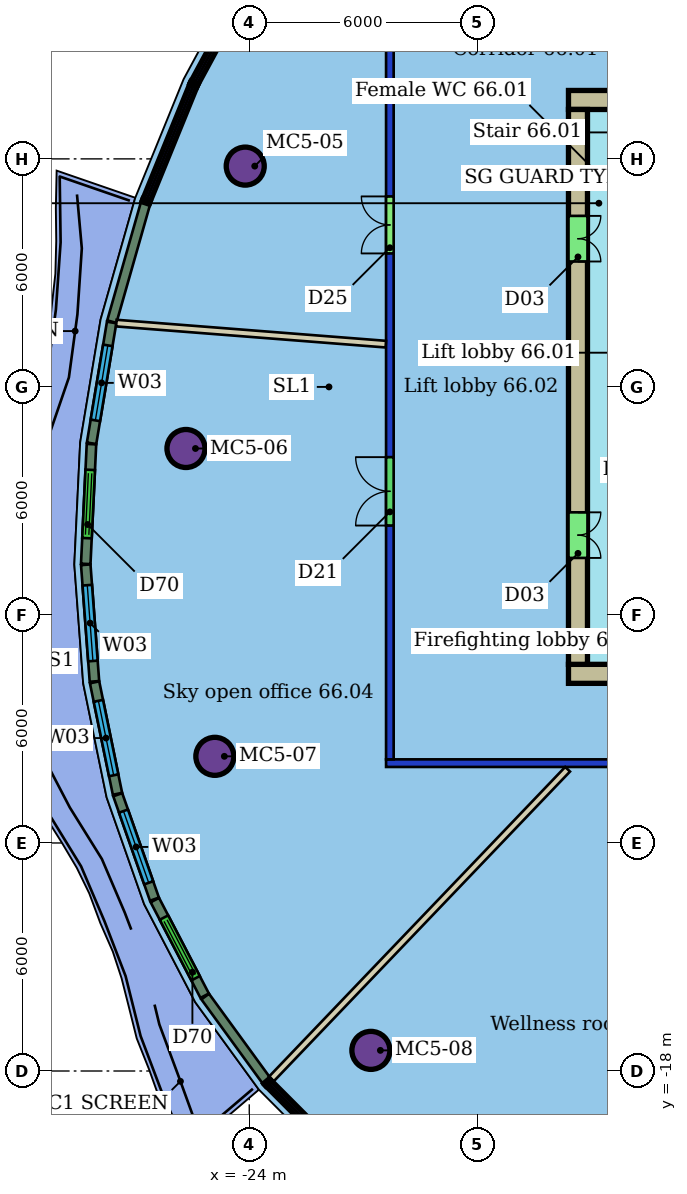
"""IFC4 building model, lengths in metres.
Left out: names, types, materials, properties, quantities, classifications, styles, units other than length and angle.
Written with IfcOpenShell. Run it as: python <this file> out.ifc"""

import sys

from ifc_helpers import new_model, si_unit, direction, frame, frame_2d, origin, origin_2d, place, context, subcontext, project, spatial, rectangle, hollow_circle, extrude, element, fill, save


model = new_model("IFC4")
c1 = context("Model", 3, precision=1e-05, world=origin(), true_north=direction((0.0, 1.0)))
c2 = subcontext(c1, "Body", "Model", "MODEL_VIEW")
j1 = project(units=[si_unit("LENGTHUNIT", "METRE"), si_unit("PLANEANGLEUNIT", "RADIAN")], contexts=[c1])
p1 = place(None, origin())
s1 = spatial("IfcSite", under=j1, at=p1, CompositionType="ELEMENT")
p2 = place(p1, origin())
s2 = spatial("IfcBuilding", under=s1, at=p2, CompositionType="ELEMENT")
p3 = place(p2, frame((0.0, 0.0, 268.5)))
s3 = spatial("IfcBuildingStorey", under=s2, at=p3, CompositionType="ELEMENT", Elevation=268.5)
for number, where, z_axis, x_axis in (
    (1, (-24.106, 5.81, 0.0), (0.0, 0.0, 1.0), (1.0, 0.0, 0.0)),
    (2, (-25.666, -1.62, 0.0), (0.0, 0.0, 1.0), (1.0, 0.0, 0.0)),
    (3, (-24.906, -9.72, 0.0), (0.0, 0.0, 1.0), (1.0, 0.0, 0.0)),
    (4, (-20.8, -17.457, 0.0), (0.0, 0.0, 1.0), (1.0, 0.0, 0.0)),
):
    element("IfcColumn", number, at=place(p3, frame(where, z_axis=z_axis, x_axis=x_axis)), inside=s3, PredefinedType="COLUMN", context=c2, shape_type="SweptSolid", body=[
        extrude(hollow_circle(Radius=0.5, WallThickness=0.04, at=origin_2d()), origin(), (0.0, 0.0, 1.0), 3.45),
    ])
p4 = place(p3, frame((8.4, -9.9, 0.0), z_axis=(0.0, 0.0, 1.0), x_axis=(-1.0, 0.0, 0.0)))
e5 = element("IfcWall", 5, at=p4, inside=s3, PredefinedType="PARTITIONING", context=c2, shape_type="SweptSolid", body=[
    extrude(rectangle(XDim=28.8, YDim=0.2, at=frame_2d((14.4, 0.0))), origin(), (0.0, 0.0, 1.0), 3.1),
])
p5 = place(p4, frame((18.739, 0.0, 0.0)))
e6 = element("IfcOpeningElement", 6, at=p5, cuts=e5, PredefinedType="OPENING", context=c2, shape_type="SweptSolid", body=[
    extrude(rectangle(XDim=1.0, YDim=2.1, at=frame_2d((0.5, 1.05))), frame((0.0, 0.11, 0.0), z_axis=(0.0, -1.0, 0.0), x_axis=(1.0, 0.0, 0.0)), (0.0, 0.0, 1.0), 0.22),
])
p6 = place(p4, frame((14.784, 0.0, 0.0)))
e7 = element("IfcOpeningElement", 7, at=p6, cuts=e5, PredefinedType="OPENING", context=c2, shape_type="SweptSolid", body=[
    extrude(rectangle(XDim=0.9, YDim=2.1, at=frame_2d((0.45, 1.05))), frame((0.0, 0.11, 0.0), z_axis=(0.0, -1.0, 0.0), x_axis=(1.0, 0.0, 0.0)), (0.0, 0.0, 1.0), 0.22),
])
p7 = place(p4, frame((9.561, 0.0, 0.0)))
e8 = element("IfcOpeningElement", 8, at=p7, cuts=e5, PredefinedType="OPENING", context=c2, shape_type="SweptSolid", body=[
    extrude(rectangle(XDim=1.0, YDim=2.1, at=frame_2d((0.5, 1.05))), frame((0.0, 0.11, 0.0), z_axis=(0.0, -1.0, 0.0), x_axis=(1.0, 0.0, 0.0)), (0.0, 0.0, 1.0), 0.22),
])
p8 = place(p4, frame((4.526, 0.0, 0.0)))
e9 = element("IfcOpeningElement", 9, at=p8, cuts=e5, PredefinedType="OPENING", context=c2, shape_type="SweptSolid", body=[
    extrude(rectangle(XDim=1.5, YDim=2.1, at=frame_2d((0.75, 1.05))), frame((0.0, 0.11, 0.0), z_axis=(0.0, -1.0, 0.0), x_axis=(1.0, 0.0, 0.0)), (0.0, 0.0, 1.0), 0.22),
])
p9 = place(p3, frame((-20.3, -9.8, 0.0), z_axis=(0.0, 0.0, 1.0), x_axis=(0.0, 1.0, 0.0)))
e10 = element("IfcWall", 10, at=p9, inside=s3, PredefinedType="PARTITIONING", context=c2, shape_type="SweptSolid", body=[
    extrude(rectangle(XDim=19.6, YDim=0.2, at=frame_2d((9.8, 0.0))), origin(), (0.0, 0.0, 1.0), 3.1),
])
p10 = place(p9, frame((13.312, 0.0, 0.0)))
e11 = element("IfcOpeningElement", 11, at=p10, cuts=e10, PredefinedType="OPENING", context=c2, shape_type="SweptSolid", body=[
    extrude(rectangle(XDim=1.5, YDim=2.4, at=frame_2d((0.75, 1.2))), frame((0.0, 0.11, 0.0), z_axis=(0.0, -1.0, 0.0), x_axis=(1.0, 0.0, 0.0)), (0.0, 0.0, 1.0), 0.22),
])
p11 = place(p9, frame((6.152, 0.0, 0.0)))
e12 = element("IfcOpeningElement", 12, at=p11, cuts=e10, PredefinedType="OPENING", context=c2, shape_type="SweptSolid", body=[
    extrude(rectangle(XDim=1.8, YDim=2.1, at=frame_2d((0.9, 1.05))), frame((0.0, 0.11, 0.0), z_axis=(0.0, -1.0, 0.0), x_axis=(1.0, 0.0, 0.0)), (0.0, 0.0, 1.0), 0.22),
])
p12 = place(p3, frame((-27.498, 1.679, 0.0), z_axis=(0.0, 0.0, 1.0), x_axis=(0.996964972733, -0.077851417097, 0.0)))
e13 = element("IfcWall", 13, at=p12, inside=s3, PredefinedType="PARTITIONING", context=c2, shape_type="SweptSolid", body=[
    extrude(rectangle(XDim=7.112, YDim=0.175, at=frame_2d((3.556, 0.0))), origin(), (0.0, 0.0, 1.0), 3.45),
])
p13 = place(p3, frame((-23.423, -18.215, 0.0), z_axis=(0.0, 0.0, 1.0), x_axis=(0.691235418305, 0.722629639913, 0.0)))
e14 = element("IfcWall", 14, at=p13, inside=s3, PredefinedType="PARTITIONING", context=c2, shape_type="SweptSolid", body=[
    extrude(rectangle(XDim=11.284, YDim=0.175, at=frame_2d((5.642, 0.0))), origin(), (0.0, 0.0, 1.0), 3.45),
])
p14 = place(p3, frame((-26.731, 4.826, 0.0), z_axis=(0.0, 0.0, 1.0), x_axis=(-0.27386313883, -0.96176867343, 0.0)))
e15 = element("IfcWall", 15, at=p14, inside=s3, PredefinedType="SOLIDWALL", context=c2, shape_type="SweptSolid", body=[
    extrude(rectangle(XDim=3.232, YDim=0.25, at=frame_2d((1.616, 0.0))), origin(), (0.0, 0.0, 1.0), 3.15),
])
p15 = place(p3, frame((-27.621, 1.696, 0.0), z_axis=(0.0, 0.0, 1.0), x_axis=(-0.163956663746, -0.986467542504, 0.0)))
e16 = element("IfcWall", 16, at=p15, inside=s3, PredefinedType="SOLIDWALL", context=c2, shape_type="SweptSolid", body=[
    extrude(rectangle(XDim=3.222, YDim=0.25, at=frame_2d((1.611, 0.0))), origin(), (0.0, 0.0, 1.0), 3.15),
])
p16 = place(p15, frame((0.611, 0.0, 0.9)))
e17 = element("IfcOpeningElement", 17, at=p16, cuts=e16, PredefinedType="OPENING", context=c2, shape_type="SweptSolid", body=[
    extrude(rectangle(XDim=2.0, YDim=2.1, at=frame_2d((1.0, 1.05))), frame((0.0, 0.135, 0.0), z_axis=(0.0, -1.0, 0.0), x_axis=(1.0, 0.0, 0.0)), (0.0, 0.0, 1.0), 0.27),
])
p17 = place(p3, frame((-28.152, -1.506, 0.0), z_axis=(0.0, 0.0, 1.0), x_axis=(-0.047748991173, -0.998859366398, 0.0)))
e18 = element("IfcWall", 18, at=p17, inside=s3, PredefinedType="SOLIDWALL", context=c2, shape_type="SweptSolid", body=[
    extrude(rectangle(XDim=3.155, YDim=0.25, at=frame_2d((1.577, 0.0))), origin(), (0.0, 0.0, 1.0), 3.15),
])
p18 = place(p17, frame((0.677, 0.0, 0.0)))
e19 = element("IfcOpeningElement", 19, at=p18, cuts=e18, PredefinedType="OPENING", context=c2, shape_type="SweptSolid", body=[
    extrude(rectangle(XDim=1.8, YDim=2.4, at=frame_2d((0.9, 1.2))), frame((0.0, 0.135, 0.0), z_axis=(0.0, -1.0, 0.0), x_axis=(1.0, 0.0, 0.0)), (0.0, 0.0, 1.0), 0.27),
])
p19 = place(p3, frame((-28.302, -4.68, 0.0), z_axis=(0.0, 0.0, 1.0), x_axis=(0.074336319404, -0.997233228296, 0.0)))
e20 = element("IfcWall", 20, at=p19, inside=s3, PredefinedType="SOLIDWALL", context=c2, shape_type="SweptSolid", body=[
    extrude(rectangle(XDim=3.077, YDim=0.25, at=frame_2d((1.539, 0.0))), origin(), (0.0, 0.0, 1.0), 3.15),
])
p20 = place(p19, frame((0.539, 0.0, 0.9)))
e21 = element("IfcOpeningElement", 21, at=p20, cuts=e20, PredefinedType="OPENING", context=c2, shape_type="SweptSolid", body=[
    extrude(rectangle(XDim=2.0, YDim=2.1, at=frame_2d((1.0, 1.05))), frame((0.0, 0.135, 0.0), z_axis=(0.0, -1.0, 0.0), x_axis=(1.0, 0.0, 0.0)), (0.0, 0.0, 1.0), 0.27),
])
p21 = place(p3, frame((-28.071, -7.773, 0.0), z_axis=(0.0, 0.0, 1.0), x_axis=(0.201427510103, -0.979503424279, 0.0)))
e22 = element("IfcWall", 22, at=p21, inside=s3, PredefinedType="SOLIDWALL", context=c2, shape_type="SweptSolid", body=[
    extrude(rectangle(XDim=2.995, YDim=0.25, at=frame_2d((1.498, 0.0))), origin(), (0.0, 0.0, 1.0), 3.15),
])
p22 = place(p21, frame((0.498, 0.0, 0.9)))
e23 = element("IfcOpeningElement", 23, at=p22, cuts=e22, PredefinedType="OPENING", context=c2, shape_type="SweptSolid", body=[
    extrude(rectangle(XDim=2.0, YDim=2.1, at=frame_2d((1.0, 1.05))), frame((0.0, 0.135, 0.0), z_axis=(0.0, -1.0, 0.0), x_axis=(1.0, 0.0, 0.0)), (0.0, 0.0, 1.0), 0.27),
])
p23 = place(p3, frame((-27.461, -10.73, 0.0), z_axis=(0.0, 0.0, 1.0), x_axis=(0.331522283712, -0.943447388784, 0.0)))
e24 = element("IfcWall", 24, at=p23, inside=s3, PredefinedType="SOLIDWALL", context=c2, shape_type="SweptSolid", body=[
    extrude(rectangle(XDim=2.913, YDim=0.25, at=frame_2d((1.457, 0.0))), origin(), (0.0, 0.0, 1.0), 3.15),
])
p24 = place(p23, frame((0.457, 0.0, 0.9)))
e25 = element("IfcOpeningElement", 25, at=p24, cuts=e24, PredefinedType="OPENING", context=c2, shape_type="SweptSolid", body=[
    extrude(rectangle(XDim=2.0, YDim=2.1, at=frame_2d((1.0, 1.05))), frame((0.0, 0.135, 0.0), z_axis=(0.0, -1.0, 0.0), x_axis=(1.0, 0.0, 0.0)), (0.0, 0.0, 1.0), 0.27),
])
p25 = place(p3, frame((-26.485, -13.502, 0.0), z_axis=(0.0, 0.0, 1.0), x_axis=(0.462051428088, -0.886853132036, 0.0)))
e26 = element("IfcWall", 26, at=p25, inside=s3, PredefinedType="SOLIDWALL", context=c2, shape_type="SweptSolid", body=[
    extrude(rectangle(XDim=2.838, YDim=0.25, at=frame_2d((1.419, 0.0))), origin(), (0.0, 0.0, 1.0), 3.15),
])
p26 = place(p25, frame((0.519, 0.0, 0.0)))
e27 = element("IfcOpeningElement", 27, at=p26, cuts=e26, PredefinedType="OPENING", context=c2, shape_type="SweptSolid", body=[
    extrude(rectangle(XDim=1.8, YDim=2.4, at=frame_2d((0.9, 1.2))), frame((0.0, 0.135, 0.0), z_axis=(0.0, -1.0, 0.0), x_axis=(1.0, 0.0, 0.0)), (0.0, 0.0, 1.0), 0.27),
])
p27 = place(p3, frame((-25.159, -16.042, 0.0), z_axis=(0.0, 0.0, 1.0), x_axis=(0.588607099097, -0.808419249457, 0.0)))
e28 = element("IfcWall", 28, at=p27, inside=s3, PredefinedType="SOLIDWALL", context=c2, shape_type="SweptSolid", body=[
    extrude(rectangle(XDim=2.733, YDim=0.25, at=frame_2d((1.367, 0.0))), origin(), (0.0, 0.0, 1.0), 3.15),
])
p28 = place(p3, frame((-6.0, 7.55, 0.0), z_axis=(0.0, 0.0, 1.0), x_axis=(-1.0, 0.0, 0.0)))
e29 = element("IfcWall", 29, at=p28, inside=s3, PredefinedType="SHEAR", context=c2, shape_type="SweptSolid", body=[
    extrude(rectangle(XDim=9.6, YDim=0.5, at=frame_2d((4.8, 0.0))), origin(), (0.0, 0.0, 1.0), 3.3),
])
p29 = place(p28, frame((5.2, 0.0, 0.0)))
e30 = element("IfcOpeningElement", 30, at=p29, cuts=e29, PredefinedType="OPENING", context=c2, shape_type="SweptSolid", body=[
    extrude(rectangle(XDim=1.2, YDim=2.1, at=frame_2d((0.6, 1.05))), frame((0.0, 0.26, 0.0), z_axis=(0.0, -1.0, 0.0), x_axis=(1.0, 0.0, 0.0)), (0.0, 0.0, 1.0), 0.52),
])
p30 = place(p3, frame((-15.6, -7.55, 0.0), z_axis=(0.0, 0.0, 1.0), x_axis=(1.0, 0.0, 0.0)))
e31 = element("IfcWall", 31, at=p30, inside=s3, PredefinedType="SHEAR", context=c2, shape_type="SweptSolid", body=[
    extrude(rectangle(XDim=19.2, YDim=0.5, at=frame_2d((9.6, 0.0))), origin(), (0.0, 0.0, 1.0), 3.3),
])
p31 = place(p30, frame((3.6, 0.0, 0.0)))
e32 = element("IfcOpeningElement", 32, at=p31, cuts=e31, PredefinedType="OPENING", context=c2, shape_type="SweptSolid", body=[
    extrude(rectangle(XDim=1.2, YDim=2.1, at=frame_2d((0.6, 1.05))), frame((0.0, 0.26, 0.0), z_axis=(0.0, -1.0, 0.0), x_axis=(1.0, 0.0, 0.0)), (0.0, 0.0, 1.0), 0.52),
])
p32 = place(p3, frame((-15.35, 7.3, 0.0), z_axis=(0.0, 0.0, 1.0), x_axis=(0.0, -1.0, 0.0)))
e33 = element("IfcWall", 33, at=p32, inside=s3, PredefinedType="SHEAR", context=c2, shape_type="SweptSolid", body=[
    extrude(rectangle(XDim=14.6, YDim=0.5, at=frame_2d((7.3, 0.0))), origin(), (0.0, 0.0, 1.0), 3.3),
])
p33 = place(p32, frame((10.6, 0.0, 0.0)))
e34 = element("IfcOpeningElement", 34, at=p33, cuts=e33, PredefinedType="OPENING", context=c2, shape_type="SweptSolid", body=[
    extrude(rectangle(XDim=1.2, YDim=2.1, at=frame_2d((0.6, 1.05))), frame((0.0, 0.26, 0.0), z_axis=(0.0, -1.0, 0.0), x_axis=(1.0, 0.0, 0.0)), (0.0, 0.0, 1.0), 0.52),
])
p34 = place(p32, frame((2.8, 0.0, 0.0)))
e35 = element("IfcOpeningElement", 35, at=p34, cuts=e33, PredefinedType="OPENING", context=c2, shape_type="SweptSolid", body=[
    extrude(rectangle(XDim=1.2, YDim=2.1, at=frame_2d((0.6, 1.05))), frame((0.0, 0.26, 0.0), z_axis=(0.0, -1.0, 0.0), x_axis=(1.0, 0.0, 0.0)), (0.0, 0.0, 1.0), 0.52),
])
p35 = place(p10, origin())
e36 = element("IfcDoor", 36, at=p35, inside=s3, OperationType="DOUBLE_DOOR_SINGLE_SWING", PredefinedType="DOOR", context=c2, shape_type="SweptSolid", body=[
    extrude(rectangle(XDim=1.5, YDim=2.4, at=frame_2d((0.75, 1.2))), frame((0.0, 0.025, 0.0), z_axis=(0.0, -1.0, 0.0), x_axis=(1.0, 0.0, 0.0)), (0.0, 0.0, 1.0), 0.05),
])
fill(e11, e36)
p36 = place(p11, origin())
e37 = element("IfcDoor", 37, at=p36, inside=s3, OperationType="DOUBLE_DOOR_SINGLE_SWING", PredefinedType="DOOR", context=c2, shape_type="SweptSolid", body=[
    extrude(rectangle(XDim=1.8, YDim=2.1, at=frame_2d((0.9, 1.05))), frame((0.0, 0.025, 0.0), z_axis=(0.0, -1.0, 0.0), x_axis=(1.0, 0.0, 0.0)), (0.0, 0.0, 1.0), 0.05),
])
fill(e12, e37)
p37 = place(p16, origin())
e38 = element("IfcWindow", 38, at=p37, inside=s3, PartitioningType="SINGLE_PANEL", PredefinedType="WINDOW", context=c2, shape_type="SweptSolid", body=[
    extrude(rectangle(XDim=2.0, YDim=2.1, at=frame_2d((1.0, 1.05))), frame((0.0, 0.03, 0.0), z_axis=(0.0, -1.0, 0.0), x_axis=(1.0, 0.0, 0.0)), (0.0, 0.0, 1.0), 0.06),
])
fill(e17, e38)
p38 = place(p18, origin())
e39 = element("IfcDoor", 39, at=p38, inside=s3, OperationType="DOUBLE_DOOR_SLIDING", PredefinedType="DOOR", context=c2, shape_type="SweptSolid", body=[
    extrude(rectangle(XDim=1.8, YDim=2.4, at=frame_2d((0.9, 1.2))), frame((0.0, 0.025, 0.0), z_axis=(0.0, -1.0, 0.0), x_axis=(1.0, 0.0, 0.0)), (0.0, 0.0, 1.0), 0.05),
])
fill(e19, e39)
p39 = place(p20, origin())
e40 = element("IfcWindow", 40, at=p39, inside=s3, PartitioningType="SINGLE_PANEL", PredefinedType="WINDOW", context=c2, shape_type="SweptSolid", body=[
    extrude(rectangle(XDim=2.0, YDim=2.1, at=frame_2d((1.0, 1.05))), frame((0.0, 0.03, 0.0), z_axis=(0.0, -1.0, 0.0), x_axis=(1.0, 0.0, 0.0)), (0.0, 0.0, 1.0), 0.06),
])
fill(e21, e40)
p40 = place(p22, origin())
e41 = element("IfcWindow", 41, at=p40, inside=s3, PartitioningType="SINGLE_PANEL", PredefinedType="WINDOW", context=c2, shape_type="SweptSolid", body=[
    extrude(rectangle(XDim=2.0, YDim=2.1, at=frame_2d((1.0, 1.05))), frame((0.0, 0.03, 0.0), z_axis=(0.0, -1.0, 0.0), x_axis=(1.0, 0.0, 0.0)), (0.0, 0.0, 1.0), 0.06),
])
fill(e23, e41)
p41 = place(p24, origin())
e42 = element("IfcWindow", 42, at=p41, inside=s3, PartitioningType="SINGLE_PANEL", PredefinedType="WINDOW", context=c2, shape_type="SweptSolid", body=[
    extrude(rectangle(XDim=2.0, YDim=2.1, at=frame_2d((1.0, 1.05))), frame((0.0, 0.03, 0.0), z_axis=(0.0, -1.0, 0.0), x_axis=(1.0, 0.0, 0.0)), (0.0, 0.0, 1.0), 0.06),
])
fill(e25, e42)
p42 = place(p26, origin())
e43 = element("IfcDoor", 43, at=p42, inside=s3, OperationType="DOUBLE_DOOR_SLIDING", PredefinedType="DOOR", context=c2, shape_type="SweptSolid", body=[
    extrude(rectangle(XDim=1.8, YDim=2.4, at=frame_2d((0.9, 1.2))), frame((0.0, 0.025, 0.0), z_axis=(0.0, -1.0, 0.0), x_axis=(1.0, 0.0, 0.0)), (0.0, 0.0, 1.0), 0.05),
])
fill(e27, e43)
p43 = place(p33, origin())
e44 = element("IfcDoor", 44, at=p43, inside=s3, OperationType="DOUBLE_DOOR_SINGLE_SWING", PredefinedType="NOTDEFINED", context=c2, shape_type="SweptSolid", body=[
    extrude(rectangle(XDim=1.2, YDim=2.1, at=frame_2d((0.6, 1.05))), frame((0.0, 0.025, 0.0), z_axis=(0.0, -1.0, 0.0), x_axis=(1.0, 0.0, 0.0)), (0.0, 0.0, 1.0), 0.05),
])
fill(e34, e44)
p44 = place(p34, origin())
e45 = element("IfcDoor", 45, at=p44, inside=s3, OperationType="DOUBLE_DOOR_SINGLE_SWING", PredefinedType="NOTDEFINED", context=c2, shape_type="SweptSolid", body=[
    extrude(rectangle(XDim=1.2, YDim=2.1, at=frame_2d((0.6, 1.05))), frame((0.0, 0.025, 0.0), z_axis=(0.0, -1.0, 0.0), x_axis=(1.0, 0.0, 0.0)), (0.0, 0.0, 1.0), 0.05),
])
fill(e35, e45)
save(model, sys.argv[1])
